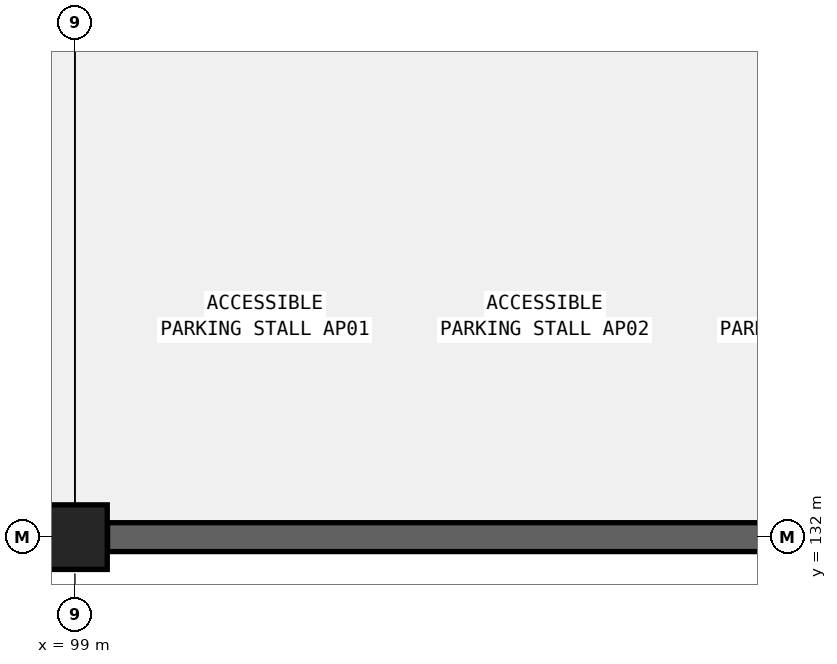
"""IFC4 building model, lengths in metres.
Left out: names, types, materials, properties, quantities, classifications, styles, units other than length and angle.
Written with IfcOpenShell. Run it as: python <this file> out.ifc"""

import sys

from ifc_helpers import new_model, si_unit, direction, frame, frame_2d, origin, origin_2d, place, context, subcontext, project, spatial, rectangle, circle, extrude, element, save


model = new_model("IFC4")
c1 = context("Model", 3, precision=1e-05, world=origin(), true_north=direction((0.0, 1.0)))
c2 = subcontext(c1, "Body", "Model", "MODEL_VIEW")
j1 = project(units=[si_unit("LENGTHUNIT", "METRE"), si_unit("PLANEANGLEUNIT", "RADIAN")], contexts=[c1])
p1 = place(None, origin())
s1 = spatial("IfcSite", under=j1, at=p1, CompositionType="ELEMENT")
p2 = place(p1, origin())
s2 = spatial("IfcBuilding", under=s1, at=p2, CompositionType="ELEMENT")
p3 = place(p2, frame((0.0, 0.0, -4.8)))
s3 = spatial("IfcBuildingStorey", under=s2, at=p3, CompositionType="ELEMENT", Elevation=-4.8)
p4 = place(p3, frame((99.0, 132.0, 0.0), z_axis=(0.0, 0.0, 1.0), x_axis=(1.0, 0.0, 0.0)))
e1 = element("IfcColumn", 1, at=p4, inside=s3, PredefinedType="COLUMN", context=c2, shape_type="SweptSolid", body=[
    extrude(circle(Radius=0.425, at=origin_2d()), origin(), (0.0, 0.0, 1.0), 4.8),
])
p5 = place(p3, frame((99.429, 132.0, 0.0), z_axis=(0.0, 0.0, 1.0), x_axis=(1.0, 0.0, 0.0)))
e2 = element("IfcWall", 2, at=p5, inside=s3, PredefinedType="STANDARD", context=c2, shape_type="SweptSolid", body=[
    extrude(rectangle(XDim=12.067, YDim=0.38, at=frame_2d((6.034, 0.0))), origin(), (0.0, 0.0, 1.0), 4.46),
])
save(model, sys.argv[1])
